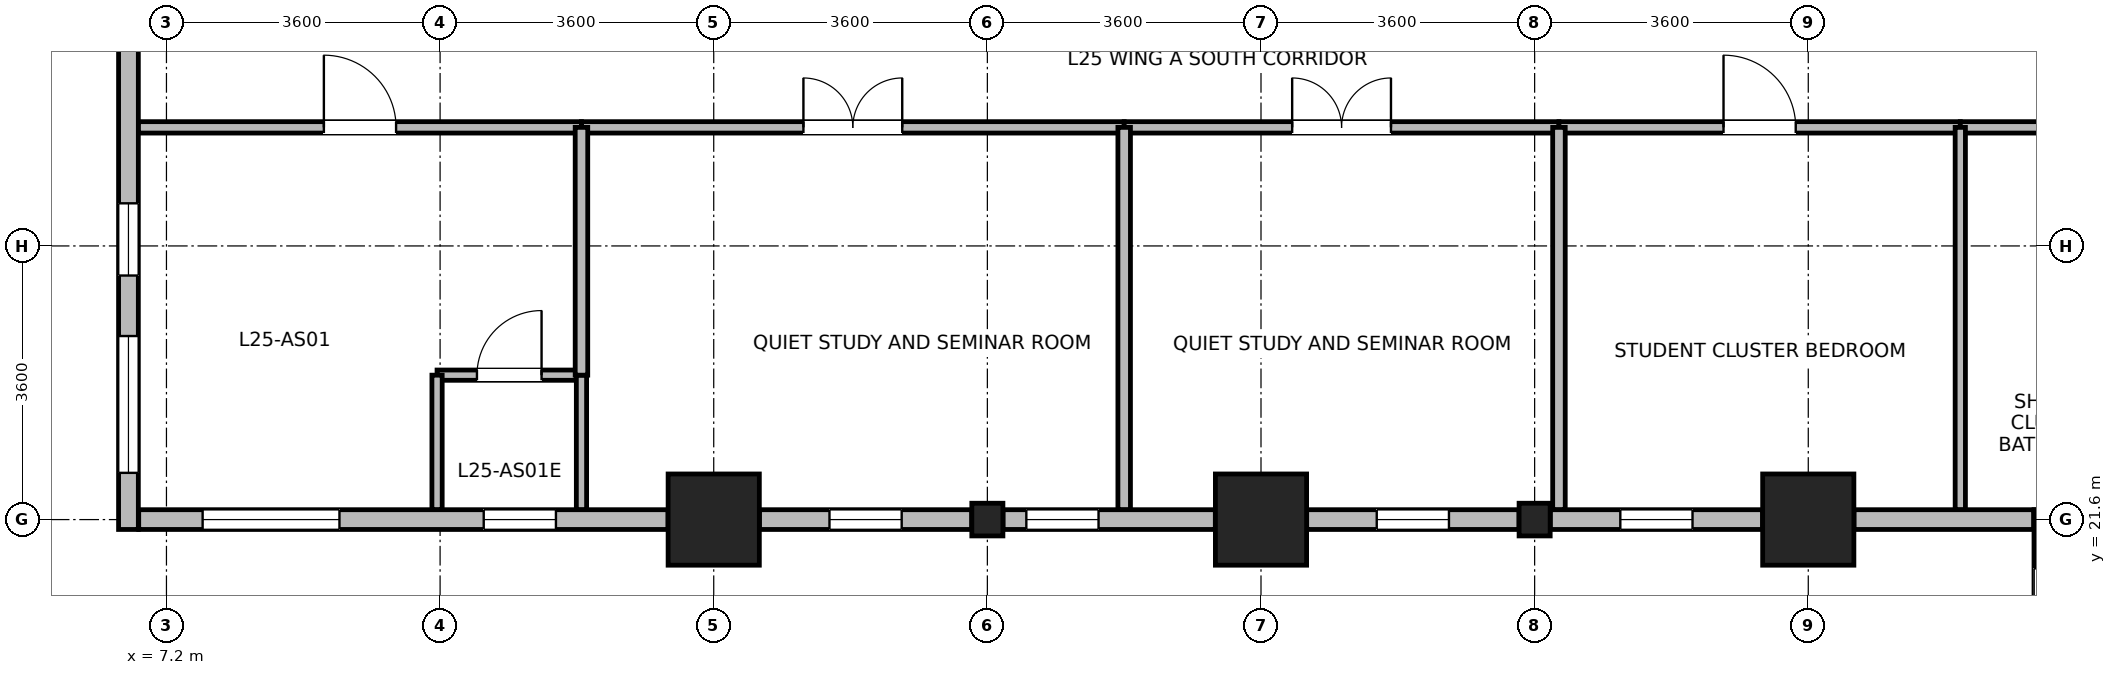
"""IFC4 building model, lengths in metres.
Left out: names, types, materials, properties, quantities, classifications, styles, units other than length and angle.
Written with IfcOpenShell. Run it as: python <this file> out.ifc"""

import sys

from ifc_helpers import new_model, si_unit, direction, frame, frame_2d, origin, origin_2d, place, context, subcontext, project, spatial, rectangle, i_section, extrude, source, transform, mapped, element, fill, save


model = new_model("IFC4")
c1 = context("Model", 3, precision=1e-05, world=origin(), true_north=direction((0.0, 1.0)))
c2 = subcontext(c1, "Body", "Model", "MODEL_VIEW")
j1 = project(units=[si_unit("LENGTHUNIT", "METRE"), si_unit("PLANEANGLEUNIT", "RADIAN")], contexts=[c1])
p1 = place(None, origin())
s1 = spatial("IfcSite", under=j1, at=p1, CompositionType="ELEMENT")
p2 = place(p1, origin())
s2 = spatial("IfcBuilding", under=s1, at=p2, CompositionType="ELEMENT")
p3 = place(p2, frame((0.0, 0.0, 100.8)))
s3 = spatial("IfcBuildingStorey", under=s2, at=p3, CompositionType="ELEMENT", Elevation=100.8)
m1 = source(origin(), c2, "Body", "SweptSolid", [
    extrude(rectangle(XDim=1.2, YDim=1.2, at=origin_2d()), origin(), (0.0, 0.0, 1.0), 3.7),
])
for number, where, z_axis, x_axis in (
    (1, (14.4, 21.6, 0.0), (0.0, 0.0, 1.0), (1.0, 0.0, 0.0)),
    (2, (21.6, 21.6, 0.0), (0.0, 0.0, 1.0), (1.0, 0.0, 0.0)),
    (3, (28.8, 21.6, 0.0), (0.0, 0.0, 1.0), (1.0, 0.0, 0.0)),
):
    element("IfcColumn", number, at=place(p3, frame(where, z_axis=z_axis, x_axis=x_axis)), inside=s3, PredefinedType="COLUMN", context=c2, shape_type="MappedRepresentation", body=[
        mapped(m1, transform((0.0, 0.0, 0.0), x_axis=(1.0, 0.0, 0.0), y_axis=(0.0, 1.0, 0.0), z_axis=(0.0, 0.0, 1.0), scale=1.0)),
    ])
m2 = source(origin(), c2, "Body", "SweptSolid", [
    extrude(i_section(OverallWidth=0.409, OverallDepth=0.43, WebThickness=0.024, FlangeThickness=0.033, FilletRadius=0.015, at=origin_2d()), origin(), (0.0, 0.0, 1.0), 3.7),
])
for number, where, z_axis, x_axis in (
    (4, (18.0, 21.6, 0.0), (0.0, 0.0, 1.0), (1.0, 0.0, 0.0)),
    (5, (25.2, 21.6, 0.0), (0.0, 0.0, 1.0), (1.0, 0.0, 0.0)),
):
    element("IfcColumn", number, at=place(p3, frame(where, z_axis=z_axis, x_axis=x_axis)), inside=s3, PredefinedType="COLUMN", context=c2, shape_type="MappedRepresentation", body=[
        mapped(m2, transform((0.0, 0.0, 0.0), x_axis=(1.0, 0.0, 0.0), y_axis=(0.0, 1.0, 0.0), z_axis=(0.0, 0.0, 1.0), scale=1.0)),
    ])
p4 = place(p3, frame((6.7, 21.47, 0.0), z_axis=(0.0, 0.0, 1.0), x_axis=(0.0, 1.0, 0.0)))
e6 = element("IfcWall", 6, at=p4, inside=s3, PredefinedType="STANDARD", context=c2, shape_type="SweptSolid", body=[
    extrude(rectangle(XDim=6.579, YDim=0.26, at=frame_2d((3.29, 0.0))), origin(), (0.0, 0.0, 1.0), 3.43),
])
p5 = place(p4, frame((0.745, 0.0, 0.85)))
e7 = element("IfcOpeningElement", 7, at=p5, cuts=e6, PredefinedType="OPENING", context=c2, shape_type="SweptSolid", body=[
    extrude(rectangle(XDim=1.8, YDim=1.85, at=frame_2d((0.9, 0.925))), frame((0.0, 0.14, 0.0), z_axis=(0.0, -1.0, 0.0), x_axis=(1.0, 0.0, 0.0)), (0.0, 0.0, 1.0), 0.28),
])
p6 = place(p4, frame((3.341, 0.0, 0.85)))
e8 = element("IfcOpeningElement", 8, at=p6, cuts=e6, PredefinedType="OPENING", context=c2, shape_type="SweptSolid", body=[
    extrude(rectangle(XDim=0.95, YDim=1.75, at=frame_2d((0.475, 0.875))), frame((0.0, 0.14, 0.0), z_axis=(0.0, -1.0, 0.0), x_axis=(1.0, 0.0, 0.0)), (0.0, 0.0, 1.0), 0.28),
])
p7 = place(p3, frame((13.799, 21.6, 0.0), z_axis=(0.0, 0.0, 1.0), x_axis=(-1.0, 0.0, 0.0)))
e9 = element("IfcWall", 9, at=p7, inside=s3, PredefinedType="STANDARD", context=c2, shape_type="SweptSolid", body=[
    extrude(rectangle(XDim=6.964, YDim=0.26, at=frame_2d((3.482, 0.0))), origin(), (0.0, 0.0, 1.0), 3.43),
])
p8 = place(p7, frame((4.323, 0.0, 0.85)))
e10 = element("IfcOpeningElement", 10, at=p8, cuts=e9, PredefinedType="OPENING", context=c2, shape_type="SweptSolid", body=[
    extrude(rectangle(XDim=1.8, YDim=1.85, at=frame_2d((0.9, 0.925))), frame((0.0, 0.14, 0.0), z_axis=(0.0, -1.0, 0.0), x_axis=(1.0, 0.0, 0.0)), (0.0, 0.0, 1.0), 0.28),
])
p9 = place(p7, frame((1.475, 0.0, 0.85)))
e11 = element("IfcOpeningElement", 11, at=p9, cuts=e9, PredefinedType="OPENING", context=c2, shape_type="SweptSolid", body=[
    extrude(rectangle(XDim=0.95, YDim=1.75, at=frame_2d((0.475, 0.875))), frame((0.0, 0.14, 0.0), z_axis=(0.0, -1.0, 0.0), x_axis=(1.0, 0.0, 0.0)), (0.0, 0.0, 1.0), 0.28),
])
p10 = place(p3, frame((17.794, 21.6, 0.0), z_axis=(0.0, 0.0, 1.0), x_axis=(-1.0, 0.0, 0.0)))
e12 = element("IfcWall", 12, at=p10, inside=s3, PredefinedType="STANDARD", context=c2, shape_type="SweptSolid", body=[
    extrude(rectangle(XDim=2.793, YDim=0.26, at=frame_2d((1.397, 0.0))), origin(), (0.0, 0.0, 1.0), 2.98),
])
p11 = place(p10, frame((0.922, 0.0, 0.85)))
e13 = element("IfcOpeningElement", 13, at=p11, cuts=e12, PredefinedType="OPENING", context=c2, shape_type="SweptSolid", body=[
    extrude(rectangle(XDim=0.95, YDim=1.75, at=frame_2d((0.475, 0.875))), frame((0.0, 0.14, 0.0), z_axis=(0.0, -1.0, 0.0), x_axis=(1.0, 0.0, 0.0)), (0.0, 0.0, 1.0), 0.28),
])
p12 = place(p3, frame((20.999, 21.6, 0.0), z_axis=(0.0, 0.0, 1.0), x_axis=(-1.0, 0.0, 0.0)))
e14 = element("IfcWall", 14, at=p12, inside=s3, PredefinedType="STANDARD", context=c2, shape_type="SweptSolid", body=[
    extrude(rectangle(XDim=2.793, YDim=0.26, at=frame_2d((1.397, 0.0))), origin(), (0.0, 0.0, 1.0), 2.98),
])
p13 = place(p12, frame((1.536, 0.0, 0.85)))
e15 = element("IfcOpeningElement", 15, at=p13, cuts=e14, PredefinedType="OPENING", context=c2, shape_type="SweptSolid", body=[
    extrude(rectangle(XDim=0.95, YDim=1.75, at=frame_2d((0.475, 0.875))), frame((0.0, 0.14, 0.0), z_axis=(0.0, -1.0, 0.0), x_axis=(1.0, 0.0, 0.0)), (0.0, 0.0, 1.0), 0.28),
])
p14 = place(p3, frame((24.994, 21.6, 0.0), z_axis=(0.0, 0.0, 1.0), x_axis=(-1.0, 0.0, 0.0)))
e16 = element("IfcWall", 16, at=p14, inside=s3, PredefinedType="STANDARD", context=c2, shape_type="SweptSolid", body=[
    extrude(rectangle(XDim=2.793, YDim=0.26, at=frame_2d((1.397, 0.0))), origin(), (0.0, 0.0, 1.0), 2.98),
])
p15 = place(p14, frame((0.922, 0.0, 0.85)))
e17 = element("IfcOpeningElement", 17, at=p15, cuts=e16, PredefinedType="OPENING", context=c2, shape_type="SweptSolid", body=[
    extrude(rectangle(XDim=0.95, YDim=1.75, at=frame_2d((0.475, 0.875))), frame((0.0, 0.14, 0.0), z_axis=(0.0, -1.0, 0.0), x_axis=(1.0, 0.0, 0.0)), (0.0, 0.0, 1.0), 0.28),
])
p16 = place(p3, frame((28.199, 21.6, 0.0), z_axis=(0.0, 0.0, 1.0), x_axis=(-1.0, 0.0, 0.0)))
e18 = element("IfcWall", 18, at=p16, inside=s3, PredefinedType="STANDARD", context=c2, shape_type="SweptSolid", body=[
    extrude(rectangle(XDim=2.793, YDim=0.26, at=frame_2d((1.397, 0.0))), origin(), (0.0, 0.0, 1.0), 2.98),
])
p17 = place(p16, frame((0.922, 0.0, 0.85)))
e19 = element("IfcOpeningElement", 19, at=p17, cuts=e18, PredefinedType="OPENING", context=c2, shape_type="SweptSolid", body=[
    extrude(rectangle(XDim=0.95, YDim=1.75, at=frame_2d((0.475, 0.875))), frame((0.0, 0.14, 0.0), z_axis=(0.0, -1.0, 0.0), x_axis=(1.0, 0.0, 0.0)), (0.0, 0.0, 1.0), 0.28),
])
p18 = place(p3, frame((31.765, 21.6, 0.0), z_axis=(0.0, 0.0, 1.0), x_axis=(-1.0, 0.0, 0.0)))
e20 = element("IfcWall", 20, at=p18, inside=s3, PredefinedType="STANDARD", context=c2, shape_type="SweptSolid", body=[
    extrude(rectangle(XDim=2.364, YDim=0.26, at=frame_2d((1.182, 0.0))), origin(), (0.0, 0.0, 1.0), 2.98),
])
p19 = place(p3, frame((31.9, 1.67, 0.0), z_axis=(0.0, 0.0, 1.0), x_axis=(0.0, 1.0, 0.0)))
e21 = element("IfcWall", 21, at=p19, inside=s3, PredefinedType="STANDARD", context=c2, shape_type="SweptSolid", body=[
    extrude(rectangle(XDim=20.06, YDim=0.26, at=frame_2d((10.03, 0.0))), origin(), (0.0, 0.0, 1.0), 3.43),
])
p20 = place(p19, frame((0.772, 0.0, 0.85)))
e22 = element("IfcOpeningElement", 22, at=p20, cuts=e21, PredefinedType="OPENING", context=c2, shape_type="SweptSolid", body=[
    extrude(rectangle(XDim=1.8, YDim=1.85, at=frame_2d((0.9, 0.925))), frame((0.0, 0.14, 0.0), z_axis=(0.0, -1.0, 0.0), x_axis=(1.0, 0.0, 0.0)), (0.0, 0.0, 1.0), 0.28),
])
p21 = place(p19, frame((7.458, 0.0, 0.85)))
e23 = element("IfcOpeningElement", 23, at=p21, cuts=e21, PredefinedType="OPENING", context=c2, shape_type="SweptSolid", body=[
    extrude(rectangle(XDim=1.8, YDim=1.85, at=frame_2d((0.9, 0.925))), frame((0.0, 0.14, 0.0), z_axis=(0.0, -1.0, 0.0), x_axis=(1.0, 0.0, 0.0)), (0.0, 0.0, 1.0), 0.28),
])
p22 = place(p19, frame((14.145, 0.0, 0.85)))
e24 = element("IfcOpeningElement", 24, at=p22, cuts=e21, PredefinedType="OPENING", context=c2, shape_type="SweptSolid", body=[
    extrude(rectangle(XDim=1.8, YDim=1.85, at=frame_2d((0.9, 0.925))), frame((0.0, 0.14, 0.0), z_axis=(0.0, -1.0, 0.0), x_axis=(1.0, 0.0, 0.0)), (0.0, 0.0, 1.0), 0.28),
])
p23 = place(p19, frame((17.488, 0.0, 0.85)))
e25 = element("IfcOpeningElement", 25, at=p23, cuts=e21, PredefinedType="OPENING", context=c2, shape_type="SweptSolid", body=[
    extrude(rectangle(XDim=1.8, YDim=1.85, at=frame_2d((0.9, 0.925))), frame((0.0, 0.14, 0.0), z_axis=(0.0, -1.0, 0.0), x_axis=(1.0, 0.0, 0.0)), (0.0, 0.0, 1.0), 0.28),
])
p24 = place(p3, frame((10.76, 23.5, 0.0), z_axis=(0.0, 0.0, 1.0), x_axis=(1.0, 0.0, 0.0)))
e26 = element("IfcWall", 26, at=p24, inside=s3, PredefinedType="PARTITIONING", context=c2, shape_type="SweptSolid", body=[
    extrude(rectangle(XDim=1.9, YDim=0.135, at=frame_2d((0.95, 0.0))), origin(), (0.0, 0.0, 1.0), 3.43),
])
p25 = place(p24, frame((0.525, 0.0, 0.0)))
e27 = element("IfcOpeningElement", 27, at=p25, cuts=e26, PredefinedType="OPENING", context=c2, shape_type="SweptSolid", body=[
    extrude(rectangle(XDim=0.85, YDim=2.04, at=frame_2d((0.425, 1.02))), frame((0.0, 0.078, 0.0), z_axis=(0.0, -1.0, 0.0), x_axis=(1.0, 0.0, 0.0)), (0.0, 0.0, 1.0), 0.155),
])
for number, where, z_axis, x_axis in (
    (28, (10.76, 21.732, 0.0), (0.0, 0.0, 1.0), (0.0, 1.0, 0.0)),
    (29, (12.66, 21.732, 0.0), (0.0, 0.0, 1.0), (0.0, 1.0, 0.0)),
):
    element("IfcWall", number, at=place(p3, frame(where, z_axis=z_axis, x_axis=x_axis)), inside=s3, PredefinedType="PARTITIONING", context=c2, shape_type="SweptSolid", body=[
        extrude(rectangle(XDim=1.768, YDim=0.135, at=frame_2d((0.884, 0.0))), origin(), (0.0, 0.0, 1.0), 3.43),
    ])
p26 = place(p3, frame((12.66, 26.76, 0.0), z_axis=(0.0, 0.0, 1.0), x_axis=(1.0, 0.0, 0.0)))
e30 = element("IfcWall", 30, at=p26, inside=s3, PredefinedType="PARTITIONING", context=c2, shape_type="SweptSolid", body=[
    extrude(rectangle(XDim=7.14, YDim=0.15, at=frame_2d((3.57, 0.0))), origin(), (0.0, 0.0, 1.0), 3.43),
])
p27 = place(p26, frame((2.92, 0.0, 0.0)))
e31 = element("IfcOpeningElement", 31, at=p27, cuts=e30, PredefinedType="OPENING", context=c2, shape_type="SweptSolid", body=[
    extrude(rectangle(XDim=1.3, YDim=2.12, at=frame_2d((0.65, 1.06))), frame((0.0, 0.085, 0.0), z_axis=(0.0, -1.0, 0.0), x_axis=(1.0, 0.0, 0.0)), (0.0, 0.0, 1.0), 0.17),
])
p28 = place(p3, frame((6.832, 26.76, 0.0), z_axis=(0.0, 0.0, 1.0), x_axis=(1.0, 0.0, 0.0)))
e32 = element("IfcWall", 32, at=p28, inside=s3, PredefinedType="PARTITIONING", context=c2, shape_type="SweptSolid", body=[
    extrude(rectangle(XDim=5.828, YDim=0.15, at=frame_2d((2.914, 0.0))), origin(), (0.0, 0.0, 1.0), 3.43),
])
p29 = place(p28, frame((2.439, 0.0, 0.0)))
e33 = element("IfcOpeningElement", 33, at=p29, cuts=e32, PredefinedType="OPENING", context=c2, shape_type="SweptSolid", body=[
    extrude(rectangle(XDim=0.95, YDim=2.1, at=frame_2d((0.475, 1.05))), frame((0.0, 0.085, 0.0), z_axis=(0.0, -1.0, 0.0), x_axis=(1.0, 0.0, 0.0)), (0.0, 0.0, 1.0), 0.17),
])
p30 = place(p3, frame((19.8, 26.76, 0.0), z_axis=(0.0, 0.0, 1.0), x_axis=(1.0, 0.0, 0.0)))
e34 = element("IfcWall", 34, at=p30, inside=s3, PredefinedType="PARTITIONING", context=c2, shape_type="SweptSolid", body=[
    extrude(rectangle(XDim=5.72, YDim=0.15, at=frame_2d((2.86, 0.0))), origin(), (0.0, 0.0, 1.0), 3.43),
])
p31 = place(p30, frame((2.21, 0.0, 0.0)))
e35 = element("IfcOpeningElement", 35, at=p31, cuts=e34, PredefinedType="OPENING", context=c2, shape_type="SweptSolid", body=[
    extrude(rectangle(XDim=1.3, YDim=2.12, at=frame_2d((0.65, 1.06))), frame((0.0, 0.085, 0.0), z_axis=(0.0, -1.0, 0.0), x_axis=(1.0, 0.0, 0.0)), (0.0, 0.0, 1.0), 0.17),
])
p32 = place(p3, frame((25.52, 26.76, 0.0), z_axis=(0.0, 0.0, 1.0), x_axis=(1.0, 0.0, 0.0)))
e36 = element("IfcWall", 36, at=p32, inside=s3, PredefinedType="PARTITIONING", context=c2, shape_type="SweptSolid", body=[
    extrude(rectangle(XDim=5.28, YDim=0.15, at=frame_2d((2.64, 0.0))), origin(), (0.0, 0.0, 1.0), 3.43),
])
p33 = place(p32, frame((2.165, 0.0, 0.0)))
e37 = element("IfcOpeningElement", 37, at=p33, cuts=e36, PredefinedType="OPENING", context=c2, shape_type="SweptSolid", body=[
    extrude(rectangle(XDim=0.95, YDim=2.1, at=frame_2d((0.475, 1.05))), frame((0.0, 0.085, 0.0), z_axis=(0.0, -1.0, 0.0), x_axis=(1.0, 0.0, 0.0)), (0.0, 0.0, 1.0), 0.17),
])
p34 = place(p3, frame((30.8, 26.76, 0.0), z_axis=(0.0, 0.0, 1.0), x_axis=(1.0, 0.0, 0.0)))
e38 = element("IfcWall", 38, at=p34, inside=s3, PredefinedType="PARTITIONING", context=c2, shape_type="SweptSolid", body=[
    extrude(rectangle(XDim=2.56, YDim=0.15, at=frame_2d((1.28, 0.0))), origin(), (0.0, 0.0, 1.0), 3.43),
])
for number, where, z_axis, x_axis in (
    (39, (19.8, 21.732, 0.0), (0.0, 0.0, 1.0), (0.0, 1.0, 0.0)),
    (40, (25.52, 21.732, 0.0), (0.0, 0.0, 1.0), (0.0, 1.0, 0.0)),
):
    element("IfcWall", number, at=place(p3, frame(where, z_axis=z_axis, x_axis=x_axis)), inside=s3, PredefinedType="PARTITIONING", context=c2, shape_type="SweptSolid", body=[
        extrude(rectangle(XDim=5.028, YDim=0.165, at=frame_2d((2.514, 0.0))), origin(), (0.0, 0.0, 1.0), 3.43),
    ])
p35 = place(p3, frame((30.8, 21.732, 0.0), z_axis=(0.0, 0.0, 1.0), x_axis=(0.0, 1.0, 0.0)))
e41 = element("IfcWall", 41, at=p35, inside=s3, PredefinedType="PARTITIONING", context=c2, shape_type="SweptSolid", body=[
    extrude(rectangle(XDim=5.028, YDim=0.135, at=frame_2d((2.514, 0.0))), origin(), (0.0, 0.0, 1.0), 3.43),
])
p36 = place(p3, frame((12.66, 23.5, 0.0), z_axis=(0.0, 0.0, 1.0), x_axis=(0.0, 1.0, 0.0)))
e42 = element("IfcWall", 42, at=p36, inside=s3, PredefinedType="PARTITIONING", context=c2, shape_type="SweptSolid", body=[
    extrude(rectangle(XDim=3.26, YDim=0.165, at=frame_2d((1.63, 0.0))), origin(), (0.0, 0.0, 1.0), 3.43),
])
p37 = place(p5, origin())
e43 = element("IfcWindow", 43, at=p37, inside=s3, PartitioningType="SINGLE_PANEL", PredefinedType="WINDOW", context=c2, shape_type="SweptSolid", body=[
    extrude(rectangle(XDim=1.8, YDim=1.85, at=frame_2d((0.9, 0.925))), frame((0.0, 0.03, 0.0), z_axis=(0.0, -1.0, 0.0), x_axis=(1.0, 0.0, 0.0)), (0.0, 0.0, 1.0), 0.06),
])
fill(e7, e43)
p38 = place(p6, origin())
e44 = element("IfcWindow", 44, at=p38, inside=s3, PartitioningType="SINGLE_PANEL", PredefinedType="WINDOW", context=c2, shape_type="SweptSolid", body=[
    extrude(rectangle(XDim=0.95, YDim=1.75, at=frame_2d((0.475, 0.875))), frame((0.0, 0.03, 0.0), z_axis=(0.0, -1.0, 0.0), x_axis=(1.0, 0.0, 0.0)), (0.0, 0.0, 1.0), 0.06),
])
fill(e8, e44)
p39 = place(p8, origin())
e45 = element("IfcWindow", 45, at=p39, inside=s3, PartitioningType="SINGLE_PANEL", PredefinedType="WINDOW", context=c2, shape_type="SweptSolid", body=[
    extrude(rectangle(XDim=1.8, YDim=1.85, at=frame_2d((0.9, 0.925))), frame((0.0, 0.03, 0.0), z_axis=(0.0, -1.0, 0.0), x_axis=(1.0, 0.0, 0.0)), (0.0, 0.0, 1.0), 0.06),
])
fill(e10, e45)
p40 = place(p9, origin())
e46 = element("IfcWindow", 46, at=p40, inside=s3, PartitioningType="SINGLE_PANEL", PredefinedType="WINDOW", context=c2, shape_type="SweptSolid", body=[
    extrude(rectangle(XDim=0.95, YDim=1.75, at=frame_2d((0.475, 0.875))), frame((0.0, 0.03, 0.0), z_axis=(0.0, -1.0, 0.0), x_axis=(1.0, 0.0, 0.0)), (0.0, 0.0, 1.0), 0.06),
])
fill(e11, e46)
p41 = place(p11, origin())
e47 = element("IfcWindow", 47, at=p41, inside=s3, PartitioningType="SINGLE_PANEL", PredefinedType="WINDOW", context=c2, shape_type="SweptSolid", body=[
    extrude(rectangle(XDim=0.95, YDim=1.75, at=frame_2d((0.475, 0.875))), frame((0.0, 0.03, 0.0), z_axis=(0.0, -1.0, 0.0), x_axis=(1.0, 0.0, 0.0)), (0.0, 0.0, 1.0), 0.06),
])
fill(e13, e47)
p42 = place(p13, origin())
e48 = element("IfcWindow", 48, at=p42, inside=s3, PartitioningType="SINGLE_PANEL", PredefinedType="WINDOW", context=c2, shape_type="SweptSolid", body=[
    extrude(rectangle(XDim=0.95, YDim=1.75, at=frame_2d((0.475, 0.875))), frame((0.0, 0.03, 0.0), z_axis=(0.0, -1.0, 0.0), x_axis=(1.0, 0.0, 0.0)), (0.0, 0.0, 1.0), 0.06),
])
fill(e15, e48)
p43 = place(p15, origin())
e49 = element("IfcWindow", 49, at=p43, inside=s3, PartitioningType="SINGLE_PANEL", PredefinedType="WINDOW", context=c2, shape_type="SweptSolid", body=[
    extrude(rectangle(XDim=0.95, YDim=1.75, at=frame_2d((0.475, 0.875))), frame((0.0, 0.03, 0.0), z_axis=(0.0, -1.0, 0.0), x_axis=(1.0, 0.0, 0.0)), (0.0, 0.0, 1.0), 0.06),
])
fill(e17, e49)
p44 = place(p17, origin())
e50 = element("IfcWindow", 50, at=p44, inside=s3, PartitioningType="SINGLE_PANEL", PredefinedType="WINDOW", context=c2, shape_type="SweptSolid", body=[
    extrude(rectangle(XDim=0.95, YDim=1.75, at=frame_2d((0.475, 0.875))), frame((0.0, 0.03, 0.0), z_axis=(0.0, -1.0, 0.0), x_axis=(1.0, 0.0, 0.0)), (0.0, 0.0, 1.0), 0.06),
])
fill(e19, e50)
p45 = place(p25, origin())
e51 = element("IfcDoor", 51, at=p45, inside=s3, OperationType="SINGLE_SWING_RIGHT", PredefinedType="DOOR", context=c2, shape_type="SweptSolid", body=[
    extrude(rectangle(XDim=0.85, YDim=2.04, at=frame_2d((0.425, 1.02))), frame((0.0, 0.025, 0.0), z_axis=(0.0, -1.0, 0.0), x_axis=(1.0, 0.0, 0.0)), (0.0, 0.0, 1.0), 0.05),
])
fill(e27, e51)
p46 = place(p27, origin())
e52 = element("IfcDoor", 52, at=p46, inside=s3, OperationType="DOUBLE_DOOR_SINGLE_SWING", PredefinedType="DOOR", context=c2, shape_type="SweptSolid", body=[
    extrude(rectangle(XDim=1.3, YDim=2.12, at=frame_2d((0.65, 1.06))), frame((0.0, 0.025, 0.0), z_axis=(0.0, -1.0, 0.0), x_axis=(1.0, 0.0, 0.0)), (0.0, 0.0, 1.0), 0.05),
])
fill(e31, e52)
p47 = place(p29, origin())
e53 = element("IfcDoor", 53, at=p47, inside=s3, OperationType="SINGLE_SWING_LEFT", PredefinedType="DOOR", context=c2, shape_type="SweptSolid", body=[
    extrude(rectangle(XDim=0.95, YDim=2.1, at=frame_2d((0.475, 1.05))), frame((0.0, 0.025, 0.0), z_axis=(0.0, -1.0, 0.0), x_axis=(1.0, 0.0, 0.0)), (0.0, 0.0, 1.0), 0.05),
])
fill(e33, e53)
p48 = place(p31, origin())
e54 = element("IfcDoor", 54, at=p48, inside=s3, OperationType="DOUBLE_DOOR_SINGLE_SWING", PredefinedType="DOOR", context=c2, shape_type="SweptSolid", body=[
    extrude(rectangle(XDim=1.3, YDim=2.12, at=frame_2d((0.65, 1.06))), frame((0.0, 0.025, 0.0), z_axis=(0.0, -1.0, 0.0), x_axis=(1.0, 0.0, 0.0)), (0.0, 0.0, 1.0), 0.05),
])
fill(e35, e54)
p49 = place(p33, origin())
e55 = element("IfcDoor", 55, at=p49, inside=s3, OperationType="SINGLE_SWING_LEFT", PredefinedType="DOOR", context=c2, shape_type="SweptSolid", body=[
    extrude(rectangle(XDim=0.95, YDim=2.1, at=frame_2d((0.475, 1.05))), frame((0.0, 0.025, 0.0), z_axis=(0.0, -1.0, 0.0), x_axis=(1.0, 0.0, 0.0)), (0.0, 0.0, 1.0), 0.05),
])
fill(e37, e55)
save(model, sys.argv[1])
